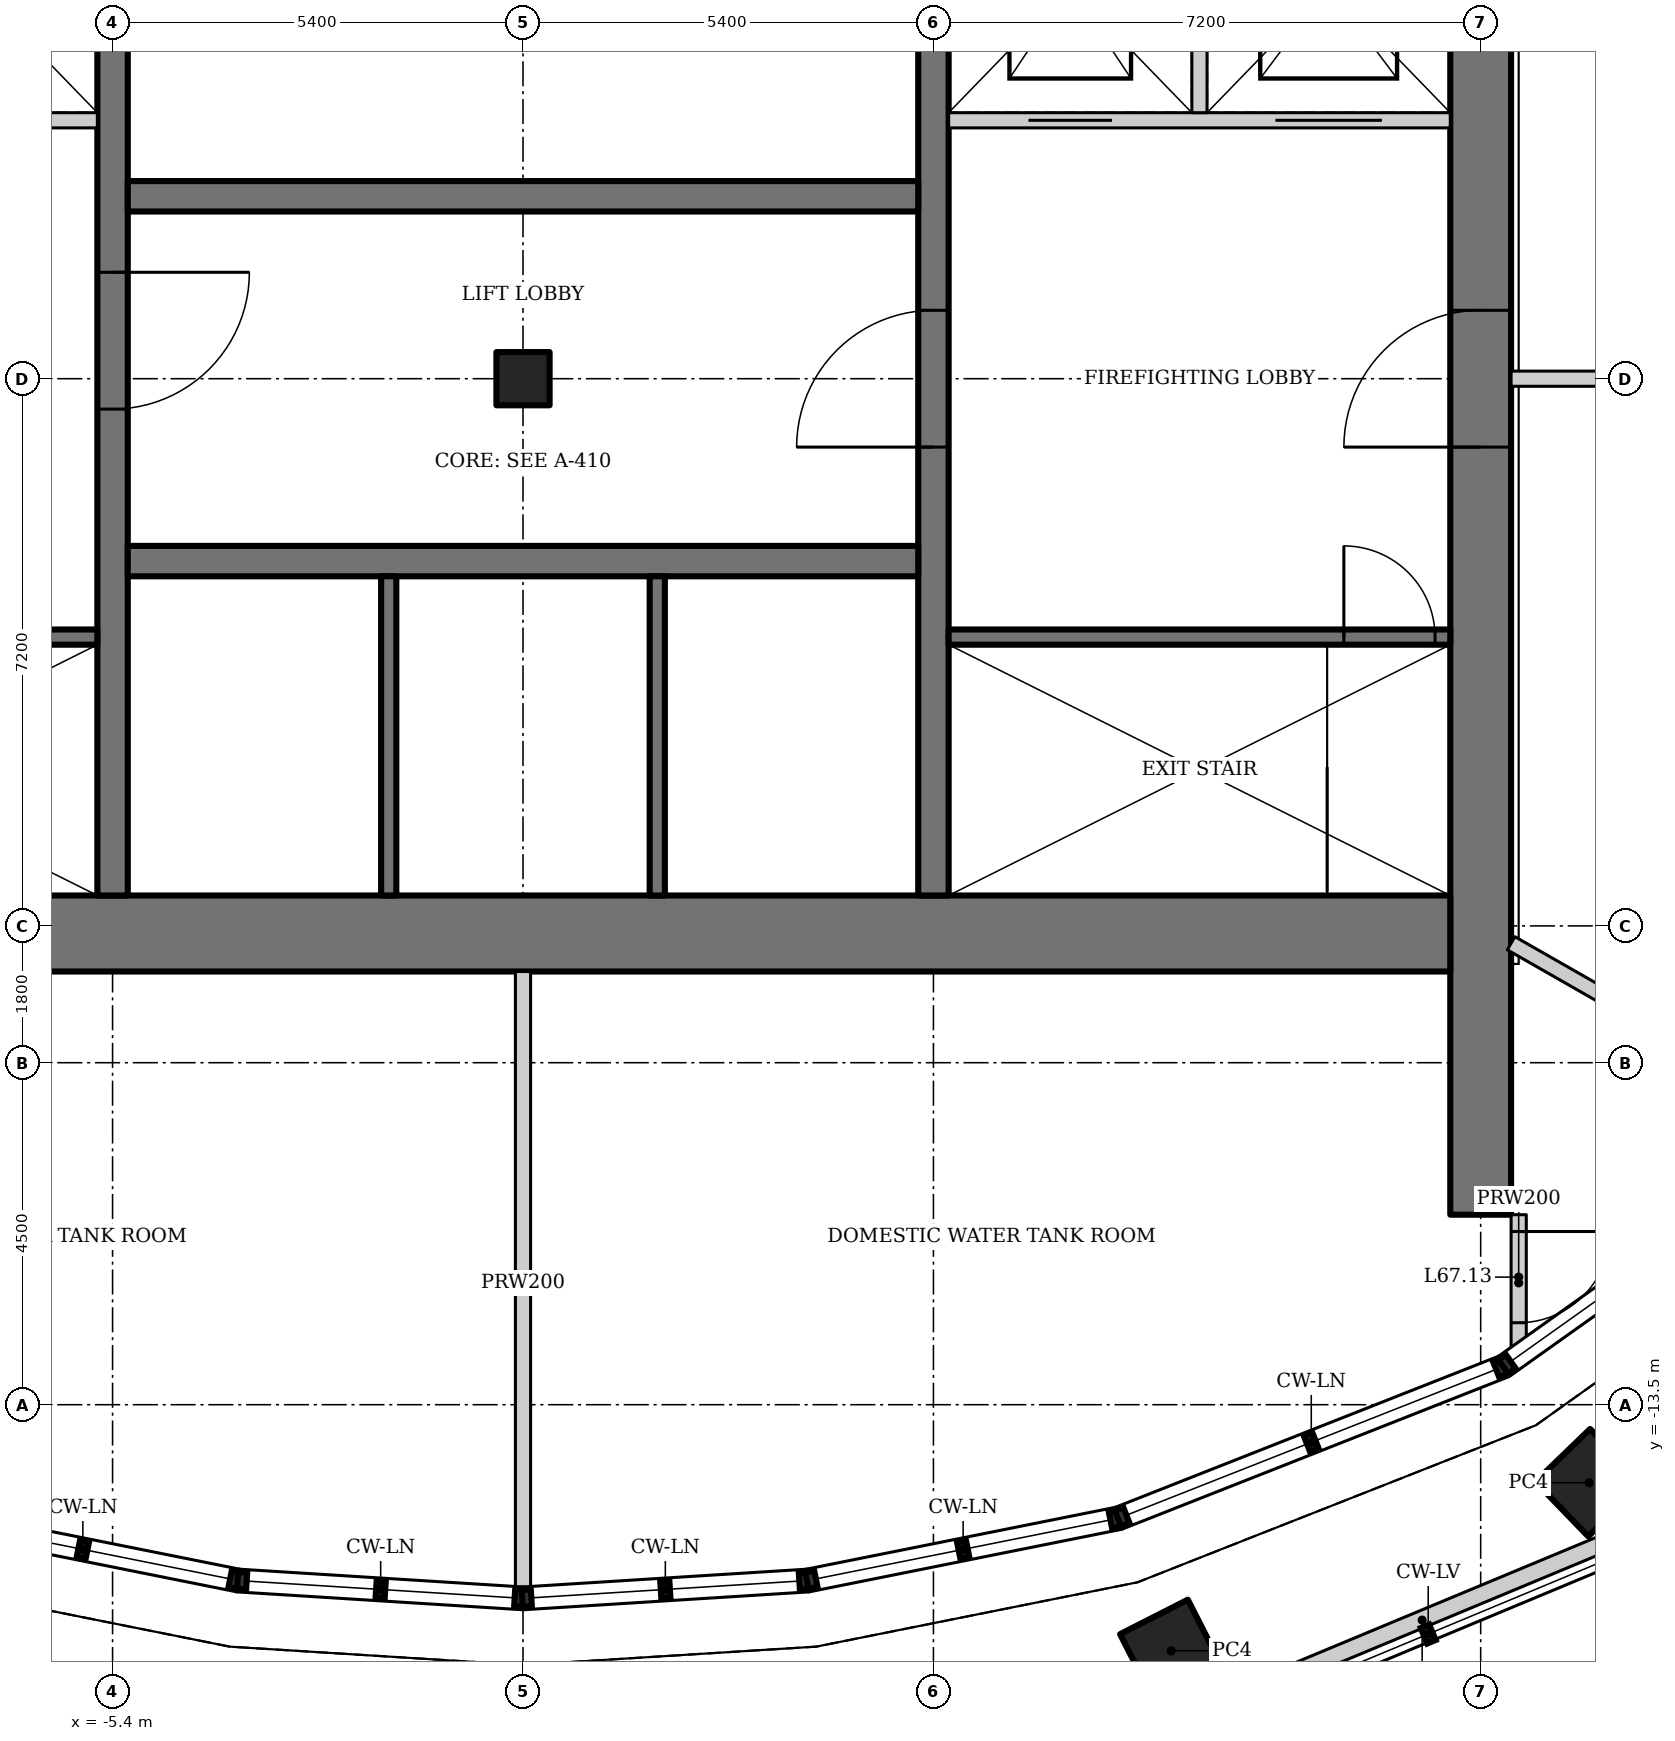
"""IFC4 building model, lengths in metres.
Left out: names, types, materials, properties, quantities, classifications, styles, units other than length and angle.
Written with IfcOpenShell. Run it as: python <this file> out.ifc"""

import sys

from ifc_helpers import new_model, si_unit, direction, frame, frame_2d, origin, origin_2d, place, context, subcontext, project, spatial, rectangle, hollow_rectangle, extrude, element, fill, save


model = new_model("IFC4")
c1 = context("Model", 3, precision=1e-05, world=origin(), true_north=direction((0.0, 1.0)))
c2 = subcontext(c1, "Body", "Model", "MODEL_VIEW")
j1 = project(units=[si_unit("LENGTHUNIT", "METRE"), si_unit("PLANEANGLEUNIT", "RADIAN")], contexts=[c1])
p1 = place(None, origin())
s1 = spatial("IfcSite", under=j1, at=p1, CompositionType="ELEMENT")
p2 = place(p1, origin())
s2 = spatial("IfcBuilding", under=s1, at=p2, CompositionType="ELEMENT")
p3 = place(p2, frame((0.0, 0.0, 290.4)))
s3 = spatial("IfcBuildingStorey", under=s2, at=p3, CompositionType="ELEMENT", Elevation=290.4)
for number, where, z_axis, x_axis in (
    (1, (8.528, -16.738, 0.0), (0.0, 0.0, 1.0), (0.891, 0.454, 0.0)),
    (2, (14.028, -14.526, 0.0), (0.0, 0.0, 1.0), (0.719, 0.695, 0.0)),
):
    element("IfcColumn", number, at=place(p3, frame(where, z_axis=z_axis, x_axis=x_axis)), inside=s3, PredefinedType="COLUMN", context=c2, shape_type="SweptSolid", body=[
        extrude(hollow_rectangle(XDim=1.0, YDim=1.0, WallThickness=0.08, at=origin_2d()), origin(), (0.0, 0.0, 1.0), 6.3),
    ])
p4 = place(p3, frame((12.6, -11.0, 0.0), z_axis=(0.0, 0.0, 1.0), x_axis=(0.0, 1.0, 0.0)))
e3 = element("IfcWall", 3, at=p4, inside=s3, PredefinedType="SHEAR", context=c2, shape_type="SweptSolid", body=[
    extrude(rectangle(XDim=22.0, YDim=0.8, at=frame_2d((11.0, 0.0))), origin(), (0.0, 0.0, 1.0), 6.0),
])
p5 = place(p4, frame((10.1, 0.0, 0.0)))
e4 = element("IfcOpeningElement", 4, at=p5, cuts=e3, PredefinedType="OPENING", context=c2, shape_type="SweptSolid", body=[
    extrude(rectangle(XDim=1.8, YDim=2.1, at=frame_2d((0.9, 1.05))), frame((0.0, 0.41, 0.0), z_axis=(0.0, -1.0, 0.0), x_axis=(1.0, 0.0, 0.0)), (0.0, 0.0, 1.0), 0.82),
])
p6 = place(p3, frame((-12.2, -7.3, 0.0), z_axis=(0.0, 0.0, 1.0), x_axis=(1.0, 0.0, 0.0)))
e5 = element("IfcWall", 5, at=p6, inside=s3, PredefinedType="SHEAR", context=c2, shape_type="SweptSolid", body=[
    extrude(rectangle(XDim=24.4, YDim=1.0, at=frame_2d((12.2, 0.0))), origin(), (0.0, 0.0, 1.0), 6.0),
])
p7 = place(p3, frame((5.4, -6.8, 0.0), z_axis=(0.0, 0.0, 1.0), x_axis=(0.0, 1.0, 0.0)))
e6 = element("IfcWall", 6, at=p7, inside=s3, PredefinedType="SHEAR", context=c2, shape_type="SweptSolid", body=[
    extrude(rectangle(XDim=14.6, YDim=0.4, at=frame_2d((7.3, 0.0))), origin(), (0.0, 0.0, 1.0), 6.0),
])
p8 = place(p7, frame((5.9, 0.0, 0.0)))
e7 = element("IfcOpeningElement", 7, at=p8, cuts=e6, PredefinedType="OPENING", context=c2, shape_type="SweptSolid", body=[
    extrude(rectangle(XDim=1.8, YDim=2.1, at=frame_2d((0.9, 1.05))), frame((0.0, 0.21, 0.0), z_axis=(0.0, -1.0, 0.0), x_axis=(1.0, 0.0, 0.0)), (0.0, 0.0, 1.0), 0.42),
])
p9 = place(p3, frame((-5.4, 7.8, 0.0), z_axis=(0.0, 0.0, 1.0), x_axis=(0.0, -1.0, 0.0)))
e8 = element("IfcWall", 8, at=p9, inside=s3, PredefinedType="SHEAR", context=c2, shape_type="SweptSolid", body=[
    extrude(rectangle(XDim=14.6, YDim=0.4, at=frame_2d((7.3, 0.0))), origin(), (0.0, 0.0, 1.0), 6.0),
])
p10 = place(p9, frame((6.4, 0.0, 0.0)))
e9 = element("IfcOpeningElement", 9, at=p10, cuts=e8, PredefinedType="OPENING", context=c2, shape_type="SweptSolid", body=[
    extrude(rectangle(XDim=1.8, YDim=2.1, at=frame_2d((0.9, 1.05))), frame((0.0, 0.21, 0.0), z_axis=(0.0, -1.0, 0.0), x_axis=(1.0, 0.0, 0.0)), (0.0, 0.0, 1.0), 0.42),
])
p11 = place(p3, frame((-5.2, -2.4, 0.0), z_axis=(0.0, 0.0, 1.0), x_axis=(1.0, 0.0, 0.0)))
e10 = element("IfcWall", 10, at=p11, inside=s3, PredefinedType="SHEAR", context=c2, shape_type="SweptSolid", body=[
    extrude(rectangle(XDim=10.4, YDim=0.4, at=frame_2d((5.2, 0.0))), origin(), (0.0, 0.0, 1.0), 6.0),
])
for number, where, z_axis, x_axis in (
    (11, (-1.767, -2.6, 0.0), (0.0, 0.0, 1.0), (0.0, -1.0, 0.0)),
    (12, (1.767, -2.6, 0.0), (0.0, 0.0, 1.0), (0.0, -1.0, 0.0)),
):
    element("IfcWall", number, at=place(p3, frame(where, z_axis=z_axis, x_axis=x_axis)), inside=s3, PredefinedType="SOLIDWALL", context=c2, shape_type="SweptSolid", body=[
        extrude(rectangle(XDim=4.2, YDim=0.2, at=frame_2d((2.1, 0.0))), origin(), (0.0, 0.0, 1.0), 6.0),
    ])
p12 = place(p3, frame((5.2, 2.4, 0.0), z_axis=(0.0, 0.0, 1.0), x_axis=(-1.0, 0.0, 0.0)))
e13 = element("IfcWall", 13, at=p12, inside=s3, PredefinedType="SHEAR", context=c2, shape_type="SweptSolid", body=[
    extrude(rectangle(XDim=10.4, YDim=0.4, at=frame_2d((5.2, 0.0))), origin(), (0.0, 0.0, 1.0), 6.0),
])
p13 = place(p3, frame((5.6, -3.4, 0.0), z_axis=(0.0, 0.0, 1.0), x_axis=(1.0, 0.0, 0.0)))
e14 = element("IfcWall", 14, at=p13, inside=s3, PredefinedType="SHEAR", context=c2, shape_type="SweptSolid", body=[
    extrude(rectangle(XDim=6.6, YDim=0.2, at=frame_2d((3.3, 0.0))), origin(), (0.0, 0.0, 1.0), 6.0),
])
p14 = place(p13, frame((5.2, 0.0, 0.0)))
e15 = element("IfcOpeningElement", 15, at=p14, cuts=e14, PredefinedType="OPENING", context=c2, shape_type="SweptSolid", body=[
    extrude(rectangle(XDim=1.2, YDim=2.1, at=frame_2d((0.6, 1.05))), frame((0.0, 0.11, 0.0), z_axis=(0.0, -1.0, 0.0), x_axis=(1.0, 0.0, 0.0)), (0.0, 0.0, 1.0), 0.22),
])
p15 = place(p3, frame((12.2, 3.4, 0.0), z_axis=(0.0, 0.0, 1.0), x_axis=(-1.0, 0.0, 0.0)))
e16 = element("IfcWall", 16, at=p15, inside=s3, PredefinedType="SOLIDWALL", context=c2, shape_type="SweptSolid", body=[
    extrude(rectangle(XDim=6.6, YDim=0.2, at=frame_2d((3.3, 0.0))), origin(), (0.0, 0.0, 1.0), 6.0),
])
p16 = place(p15, frame((4.45, 0.0, 0.0)))
e17 = element("IfcOpeningElement", 17, at=p16, cuts=e16, PredefinedType="OPENING", context=c2, shape_type="SweptSolid", body=[
    extrude(rectangle(XDim=1.1, YDim=2.2, at=frame_2d((0.55, 1.1))), frame((0.0, 0.11, 0.0), z_axis=(0.0, -1.0, 0.0), x_axis=(1.0, 0.0, 0.0)), (0.0, 0.0, 1.0), 0.22),
])
p17 = place(p15, frame((0.9, 0.0, 0.0)))
e18 = element("IfcOpeningElement", 18, at=p17, cuts=e16, PredefinedType="OPENING", context=c2, shape_type="SweptSolid", body=[
    extrude(rectangle(XDim=1.4, YDim=2.2, at=frame_2d((0.7, 1.1))), frame((0.0, 0.11, 0.0), z_axis=(0.0, -1.0, 0.0), x_axis=(1.0, 0.0, 0.0)), (0.0, 0.0, 1.0), 0.22),
])
p18 = place(p3, frame((8.9, 3.5, 0.0), z_axis=(0.0, 0.0, 1.0), x_axis=(0.0, 1.0, 0.0)))
e19 = element("IfcWall", 19, at=p18, inside=s3, PredefinedType="SOLIDWALL", context=c2, shape_type="SweptSolid", body=[
    extrude(rectangle(XDim=3.3, YDim=0.2, at=frame_2d((1.65, 0.0))), origin(), (0.0, 0.0, 1.0), 6.0),
])
p19 = place(p3, frame((-5.6, -3.4, 0.0), z_axis=(0.0, 0.0, 1.0), x_axis=(-1.0, 0.0, 0.0)))
e20 = element("IfcWall", 20, at=p19, inside=s3, PredefinedType="SHEAR", context=c2, shape_type="SweptSolid", body=[
    extrude(rectangle(XDim=6.6, YDim=0.2, at=frame_2d((3.3, 0.0))), origin(), (0.0, 0.0, 1.0), 6.0),
])
p20 = place(p19, frame((5.2, 0.0, 0.0)))
e21 = element("IfcOpeningElement", 21, at=p20, cuts=e20, PredefinedType="OPENING", context=c2, shape_type="SweptSolid", body=[
    extrude(rectangle(XDim=1.2, YDim=2.1, at=frame_2d((0.6, 1.05))), frame((0.0, 0.11, 0.0), z_axis=(0.0, -1.0, 0.0), x_axis=(1.0, 0.0, 0.0)), (0.0, 0.0, 1.0), 0.22),
])
p21 = place(p3, frame((-12.2, 3.4, 0.0), z_axis=(0.0, 0.0, 1.0), x_axis=(1.0, 0.0, 0.0)))
e22 = element("IfcWall", 22, at=p21, inside=s3, PredefinedType="SOLIDWALL", context=c2, shape_type="SweptSolid", body=[
    extrude(rectangle(XDim=6.6, YDim=0.2, at=frame_2d((3.3, 0.0))), origin(), (0.0, 0.0, 1.0), 6.0),
])
p22 = place(p21, frame((1.05, 0.0, 0.0)))
e23 = element("IfcOpeningElement", 23, at=p22, cuts=e22, PredefinedType="OPENING", context=c2, shape_type="SweptSolid", body=[
    extrude(rectangle(XDim=1.1, YDim=2.2, at=frame_2d((0.55, 1.1))), frame((0.0, 0.11, 0.0), z_axis=(0.0, -1.0, 0.0), x_axis=(1.0, 0.0, 0.0)), (0.0, 0.0, 1.0), 0.22),
])
p23 = place(p21, frame((4.3, 0.0, 0.0)))
e24 = element("IfcOpeningElement", 24, at=p23, cuts=e22, PredefinedType="OPENING", context=c2, shape_type="SweptSolid", body=[
    extrude(rectangle(XDim=1.4, YDim=2.2, at=frame_2d((0.7, 1.1))), frame((0.0, 0.11, 0.0), z_axis=(0.0, -1.0, 0.0), x_axis=(1.0, 0.0, 0.0)), (0.0, 0.0, 1.0), 0.22),
])
p24 = place(p3, frame((8.95, -17.534, 0.0), z_axis=(0.0, 0.0, 1.0), x_axis=(0.923135945789, 0.384473699481, 0.0)))
e25 = element("IfcWall", 25, at=p24, inside=s3, PredefinedType="PARAPET", context=c2, shape_type="SweptSolid", body=[
    extrude(rectangle(XDim=6.24, YDim=0.25, at=frame_2d((3.12, 0.0))), origin(), (0.0, 0.0, 1.0), 1.1),
])
p25 = place(p3, frame((0.0, 0.0, 6.0), z_axis=(0.0, 0.0, 1.0), x_axis=(1.0, 0.0, 0.0)))
e26 = element("IfcColumn", 26, at=p25, inside=s3, PredefinedType="COLUMN", context=c2, shape_type="SweptSolid", body=[
    extrude(hollow_rectangle(XDim=0.7, YDim=0.7, WallThickness=0.04, at=origin_2d()), origin(), (0.0, 0.0, 1.0), 9.8),
])
p26 = place(p3, frame((13.1, -11.0, 0.0), z_axis=(0.0, 0.0, 1.0), x_axis=(0.0, -1.0, 0.0)))
e27 = element("IfcWall", 27, at=p26, inside=s3, PredefinedType="SOLIDWALL", context=c2, shape_type="SweptSolid", body=[
    extrude(rectangle(XDim=1.794, YDim=0.2, at=frame_2d((0.897, 0.0))), origin(), (0.0, 0.0, 1.0), 6.0),
])
p27 = place(p26, frame((0.221, 0.0, 0.0)))
e28 = element("IfcOpeningElement", 28, at=p27, cuts=e27, PredefinedType="OPENING", context=c2, shape_type="SweptSolid", body=[
    extrude(rectangle(XDim=1.2, YDim=2.1, at=frame_2d((0.6, 1.05))), frame((0.0, 0.11, 0.0), z_axis=(0.0, -1.0, 0.0), x_axis=(1.0, 0.0, 0.0)), (0.0, 0.0, 1.0), 0.22),
])
p28 = place(p3, frame((13.0, 0.0, 0.0), z_axis=(0.0, 0.0, 1.0), x_axis=(1.0, 0.0, 0.0)))
e29 = element("IfcWall", 29, at=p28, inside=s3, PredefinedType="SOLIDWALL", context=c2, shape_type="SweptSolid", body=[
    extrude(rectangle(XDim=4.5, YDim=0.2, at=frame_2d((2.25, 0.0))), origin(), (0.0, 0.0, 1.0), 6.0),
])
p29 = place(p3, frame((13.0, -7.428, 0.0), z_axis=(0.0, 0.0, 1.0), x_axis=(0.868228911617, -0.496163840916, 0.0)))
e30 = element("IfcWall", 30, at=p29, inside=s3, PredefinedType="SOLIDWALL", context=c2, shape_type="SweptSolid", body=[
    extrude(rectangle(XDim=3.167, YDim=0.2, at=frame_2d((1.584, 0.0))), origin(), (0.0, 0.0, 1.0), 6.0),
])
p30 = place(p3, frame((0.0, -7.8, 0.0), z_axis=(0.0, 0.0, 1.0), x_axis=(0.0, -1.0, 0.0)))
e31 = element("IfcWall", 31, at=p30, inside=s3, PredefinedType="SOLIDWALL", context=c2, shape_type="SweptSolid", body=[
    extrude(rectangle(XDim=8.193, YDim=0.2, at=frame_2d((4.097, 0.0))), origin(), (0.0, 0.0, 1.0), 6.0),
])
p31 = place(p8, origin())
e32 = element("IfcDoor", 32, at=p31, inside=s3, OperationType="DOUBLE_DOOR_DOUBLE_SWING", PredefinedType="DOOR", context=c2, shape_type="SweptSolid", body=[
    extrude(rectangle(XDim=1.8, YDim=2.1, at=frame_2d((0.9, 1.05))), frame((0.0, 0.025, 0.0), z_axis=(0.0, -1.0, 0.0), x_axis=(1.0, 0.0, 0.0)), (0.0, 0.0, 1.0), 0.05),
])
fill(e7, e32)
p32 = place(p10, origin())
e33 = element("IfcDoor", 33, at=p32, inside=s3, OperationType="DOUBLE_DOOR_DOUBLE_SWING", PredefinedType="DOOR", context=c2, shape_type="SweptSolid", body=[
    extrude(rectangle(XDim=1.8, YDim=2.1, at=frame_2d((0.9, 1.05))), frame((0.0, 0.025, 0.0), z_axis=(0.0, -1.0, 0.0), x_axis=(1.0, 0.0, 0.0)), (0.0, 0.0, 1.0), 0.05),
])
fill(e9, e33)
p33 = place(p14, origin())
e34 = element("IfcDoor", 34, at=p33, inside=s3, OperationType="SINGLE_SWING_RIGHT", PredefinedType="DOOR", context=c2, shape_type="SweptSolid", body=[
    extrude(rectangle(XDim=1.2, YDim=2.1, at=frame_2d((0.6, 1.05))), frame((0.0, 0.025, 0.0), z_axis=(0.0, -1.0, 0.0), x_axis=(1.0, 0.0, 0.0)), (0.0, 0.0, 1.0), 0.05),
])
fill(e15, e34)
p34 = place(p5, origin())
e35 = element("IfcDoor", 35, at=p34, inside=s3, OperationType="DOUBLE_DOOR_DOUBLE_SWING", PredefinedType="DOOR", context=c2, shape_type="SweptSolid", body=[
    extrude(rectangle(XDim=1.8, YDim=2.1, at=frame_2d((0.9, 1.05))), frame((0.0, 0.025, 0.0), z_axis=(0.0, -1.0, 0.0), x_axis=(1.0, 0.0, 0.0)), (0.0, 0.0, 1.0), 0.05),
])
fill(e4, e35)
p35 = place(p16, origin())
e36 = element("IfcDoor", 36, at=p35, inside=s3, OperationType="DOUBLE_DOOR_SLIDING", PredefinedType="DOOR", context=c2, shape_type="SweptSolid", body=[
    extrude(rectangle(XDim=1.1, YDim=2.2, at=frame_2d((0.55, 1.1))), frame((0.0, 0.025, 0.0), z_axis=(0.0, -1.0, 0.0), x_axis=(1.0, 0.0, 0.0)), (0.0, 0.0, 1.0), 0.05),
])
fill(e17, e36)
p36 = place(p17, origin())
e37 = element("IfcDoor", 37, at=p36, inside=s3, OperationType="DOUBLE_DOOR_SLIDING", PredefinedType="DOOR", context=c2, shape_type="SweptSolid", body=[
    extrude(rectangle(XDim=1.4, YDim=2.2, at=frame_2d((0.7, 1.1))), frame((0.0, 0.025, 0.0), z_axis=(0.0, -1.0, 0.0), x_axis=(1.0, 0.0, 0.0)), (0.0, 0.0, 1.0), 0.05),
])
fill(e18, e37)
p37 = place(p27, origin())
e38 = element("IfcDoor", 38, at=p37, inside=s3, OperationType="SINGLE_SWING_LEFT", PredefinedType="DOOR", context=c2, shape_type="SweptSolid", body=[
    extrude(rectangle(XDim=1.2, YDim=2.1, at=frame_2d((0.6, 1.05))), frame((0.0, 0.025, 0.0), z_axis=(0.0, -1.0, 0.0), x_axis=(1.0, 0.0, 0.0)), (0.0, 0.0, 1.0), 0.05),
])
fill(e28, e38)
save(model, sys.argv[1])
